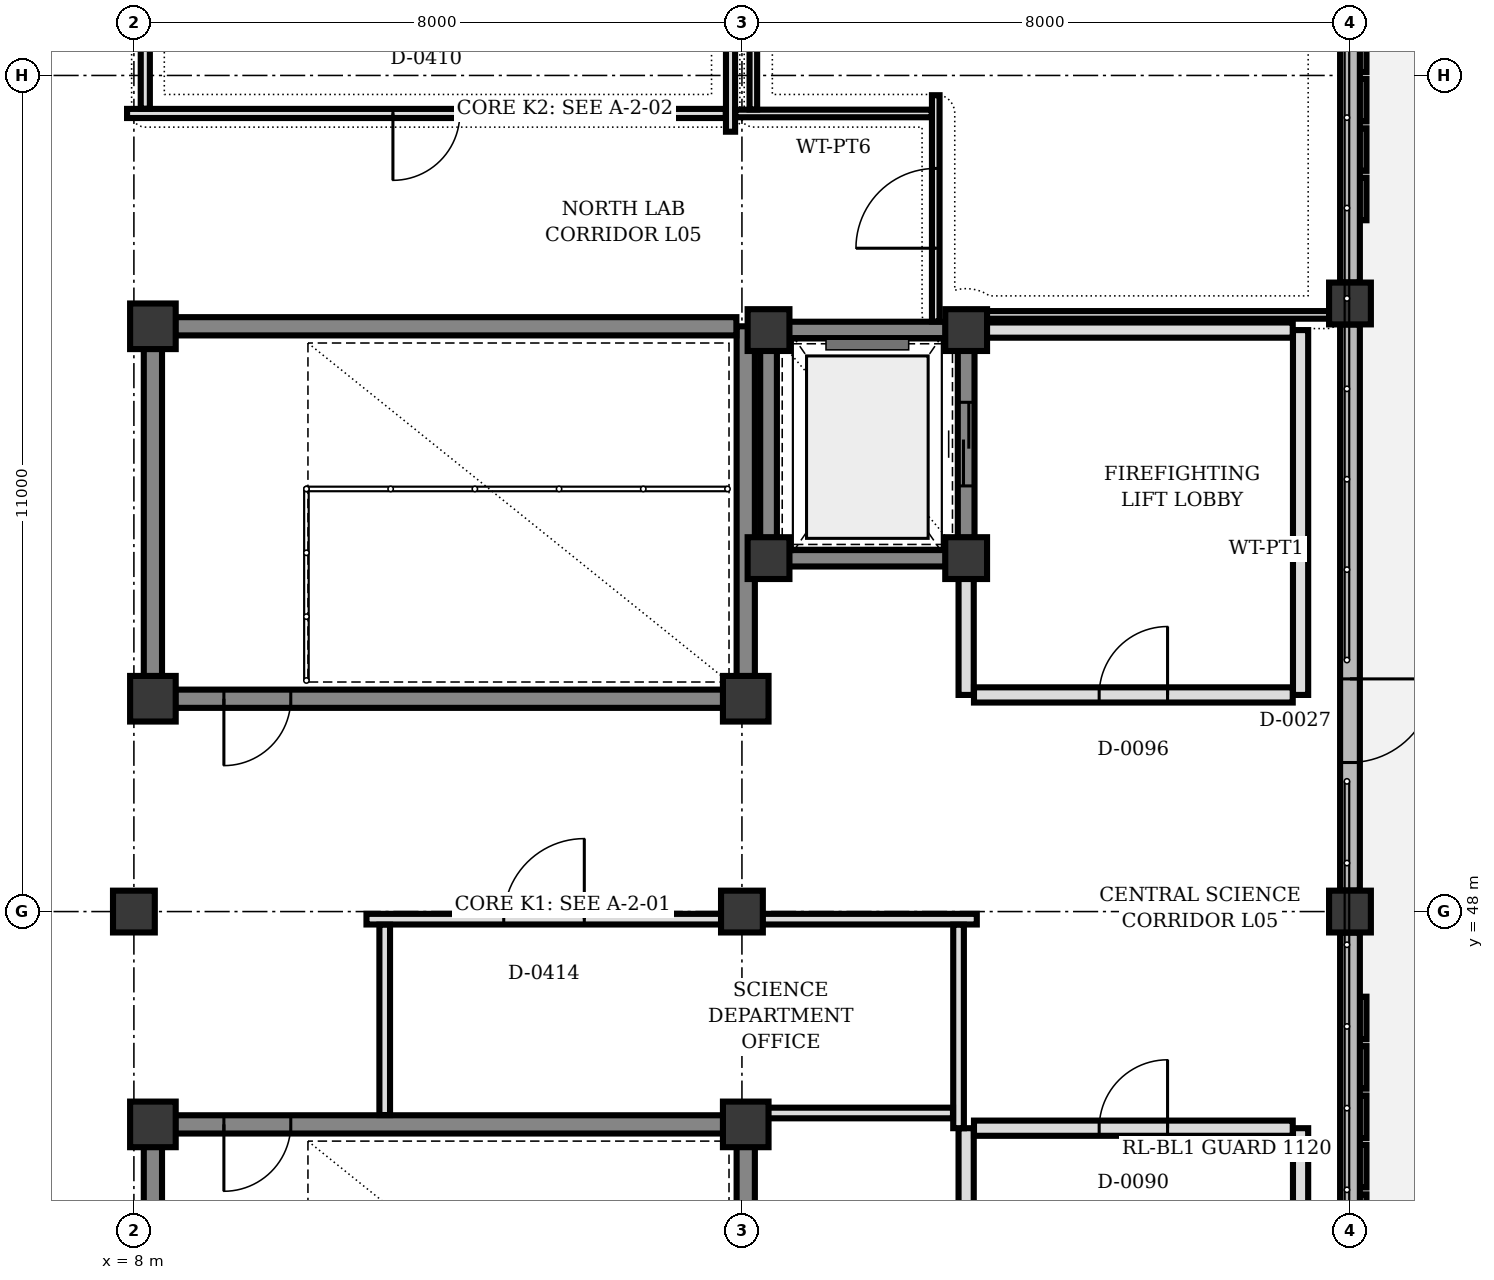
"""IFC4 building model, lengths in metres.
Left out: names, types, materials, properties, quantities, classifications, styles, units other than length and angle.
Written with IfcOpenShell. Run it as: python <this file> out.ifc"""

import sys

from ifc_helpers import new_model, si_unit, direction, frame, frame_2d, origin, origin_2d, place, context, subcontext, project, spatial, rectangle, extrude, element, fill, save


model = new_model("IFC4")
c1 = context("Model", 3, precision=1e-05, world=origin(), true_north=direction((0.0, 1.0)))
c2 = subcontext(c1, "Body", "Model", "MODEL_VIEW")
j1 = project(units=[si_unit("LENGTHUNIT", "METRE"), si_unit("PLANEANGLEUNIT", "RADIAN")], contexts=[c1])
p1 = place(None, origin())
s1 = spatial("IfcSite", under=j1, at=p1, CompositionType="ELEMENT")
p2 = place(p1, origin())
s2 = spatial("IfcBuilding", under=s1, at=p2, CompositionType="ELEMENT")
p3 = place(p2, frame((0.0, 0.0, 20.5)))
s3 = spatial("IfcBuildingStorey", under=s2, at=p3, CompositionType="ELEMENT", Elevation=20.5)
for number, where, z_axis, x_axis in (
    (1, (16.05, 45.2, 0.0), (0.0, 0.0, 1.0), (1.0, 0.0, 0.0)),
    (2, (8.25, 45.2, 0.0), (0.0, 0.0, 1.0), (1.0, 0.0, 0.0)),
    (3, (8.25, 50.8, 0.0), (0.0, 0.0, 1.0), (1.0, 0.0, 0.0)),
    (4, (16.05, 50.8, 0.0), (0.0, 0.0, 1.0), (1.0, 0.0, 0.0)),
    (5, (8.25, 55.7, 0.0), (0.0, 0.0, 1.0), (1.0, 0.0, 0.0)),
):
    element("IfcColumn", number, at=place(p3, frame(where, z_axis=z_axis, x_axis=x_axis)), inside=s3, PredefinedType="COLUMN", context=c2, shape_type="SweptSolid", body=[
        extrude(rectangle(XDim=0.6, YDim=0.6, at=origin_2d()), origin(), (0.0, 0.0, 1.0), 4.0),
    ])
for number, where, z_axis, x_axis in (
    (6, (16.35, 52.65, 0.0), (0.0, 0.0, 1.0), (1.0, 0.0, 0.0)),
    (7, (18.95, 52.65, 0.0), (0.0, 0.0, 1.0), (1.0, 0.0, 0.0)),
    (8, (18.95, 55.65, 0.0), (0.0, 0.0, 1.0), (1.0, 0.0, 0.0)),
    (9, (16.35, 55.65, 0.0), (0.0, 0.0, 1.0), (1.0, 0.0, 0.0)),
    (10, (16.0, 48.0, 0.0), (0.0, 0.0, 1.0), (1.0, 0.0, 0.0)),
    (11, (24.0, 48.0, 0.0), (0.0, 0.0, 1.0), (1.0, 0.0, 0.0)),
    (12, (24.0, 56.0, 0.0), (0.0, 0.0, 1.0), (1.0, 0.0, 0.0)),
    (13, (8.0, 48.0, 0.0), (0.0, 0.0, 1.0), (1.0, 0.0, 0.0)),
):
    element("IfcColumn", number, at=place(p3, frame(where, z_axis=z_axis, x_axis=x_axis)), inside=s3, PredefinedType="COLUMN", context=c2, shape_type="SweptSolid", body=[
        extrude(rectangle(XDim=0.55, YDim=0.55, at=origin_2d()), origin(), (0.0, 0.0, 1.0), 4.0),
    ])
p4 = place(p3, frame((24.0, 61.723, 0.0), z_axis=(0.0, 0.0, 1.0), x_axis=(0.0, -1.0, 0.0)))
e14 = element("IfcWall", 14, at=p4, inside=s3, PredefinedType="SOLIDWALL", context=c2, shape_type="SweptSolid", body=[
    extrude(rectangle(XDim=5.446, YDim=0.26, at=frame_2d((2.723, 0.0))), origin(), (0.0, 0.0, 1.0), 3.545),
])
p5 = place(p3, frame((24.0, 55.723, 0.0), z_axis=(0.0, 0.0, 1.0), x_axis=(0.0, -1.0, 0.0)))
e15 = element("IfcWall", 15, at=p5, inside=s3, PredefinedType="SOLIDWALL", context=c2, shape_type="SweptSolid", body=[
    extrude(rectangle(XDim=7.446, YDim=0.26, at=frame_2d((3.723, 0.0))), origin(), (0.0, 0.0, 1.0), 3.435),
])
p6 = place(p5, frame((4.662, 0.0, 0.0)))
e16 = element("IfcOpeningElement", 16, at=p6, cuts=e15, PredefinedType="OPENING", context=c2, shape_type="SweptSolid", body=[
    extrude(rectangle(XDim=1.1, YDim=2.25, at=frame_2d((0.55, 1.125))), frame((0.0, 0.14, 0.0), z_axis=(0.0, -1.0, 0.0), x_axis=(1.0, 0.0, 0.0)), (0.0, 0.0, 1.0), 0.28),
])
p7 = place(p3, frame((24.0, 47.723, 0.0), z_axis=(0.0, 0.0, 1.0), x_axis=(0.0, -1.0, 0.0)))
e17 = element("IfcWall", 17, at=p7, inside=s3, PredefinedType="SOLIDWALL", context=c2, shape_type="SweptSolid", body=[
    extrude(rectangle(XDim=7.446, YDim=0.26, at=frame_2d((3.723, 0.0))), origin(), (0.0, 0.0, 1.0), 3.397),
])
p8 = place(p3, frame((8.25, 40.592, 0.0), z_axis=(0.0, 0.0, 1.0), x_axis=(0.0, 1.0, 0.0)))
e18 = element("IfcWall", 18, at=p8, inside=s3, PredefinedType="SHEAR", context=c2, shape_type="SweptSolid", body=[
    extrude(rectangle(XDim=4.316, YDim=0.24, at=frame_2d((2.158, 0.0))), origin(), (0.0, 0.0, 1.0), 3.74),
])
p9 = place(p3, frame((16.05, 44.908, 0.0), z_axis=(0.0, 0.0, 1.0), x_axis=(0.0, -1.0, 0.0)))
e19 = element("IfcWall", 19, at=p9, inside=s3, PredefinedType="SHEAR", context=c2, shape_type="SweptSolid", body=[
    extrude(rectangle(XDim=4.608, YDim=0.24, at=frame_2d((2.304, 0.0))), origin(), (0.0, 0.0, 1.0), 3.74),
])
p10 = place(p3, frame((15.758, 45.2, 0.0), z_axis=(0.0, 0.0, 1.0), x_axis=(-1.0, 0.0, 0.0)))
e20 = element("IfcWall", 20, at=p10, inside=s3, PredefinedType="SHEAR", context=c2, shape_type="SweptSolid", body=[
    extrude(rectangle(XDim=7.216, YDim=0.24, at=frame_2d((3.608, 0.0))), origin(), (0.0, 0.0, 1.0), 3.74),
])
p11 = place(p10, frame((5.694, 0.0, 0.0)))
e21 = element("IfcOpeningElement", 21, at=p11, cuts=e20, PredefinedType="OPENING", context=c2, shape_type="SweptSolid", body=[
    extrude(rectangle(XDim=0.88, YDim=2.1, at=frame_2d((0.44, 1.05))), frame((0.0, 0.13, 0.0), z_axis=(0.0, -1.0, 0.0), x_axis=(1.0, 0.0, 0.0)), (0.0, 0.0, 1.0), 0.26),
])
p12 = place(p3, frame((8.25, 51.092, 0.0), z_axis=(0.0, 0.0, 1.0), x_axis=(0.0, 1.0, 0.0)))
e22 = element("IfcWall", 22, at=p12, inside=s3, PredefinedType="SHEAR", context=c2, shape_type="SweptSolid", body=[
    extrude(rectangle(XDim=4.316, YDim=0.24, at=frame_2d((2.158, 0.0))), origin(), (0.0, 0.0, 1.0), 3.74),
])
p13 = place(p3, frame((16.05, 55.7, 0.0), z_axis=(0.0, 0.0, 1.0), x_axis=(0.0, -1.0, 0.0)))
e23 = element("IfcWall", 23, at=p13, inside=s3, PredefinedType="SHEAR", context=c2, shape_type="SweptSolid", body=[
    extrude(rectangle(XDim=4.608, YDim=0.24, at=frame_2d((2.304, 0.0))), origin(), (0.0, 0.0, 1.0), 3.74),
])
p14 = place(p3, frame((15.758, 50.8, 0.0), z_axis=(0.0, 0.0, 1.0), x_axis=(-1.0, 0.0, 0.0)))
e24 = element("IfcWall", 24, at=p14, inside=s3, PredefinedType="SHEAR", context=c2, shape_type="SweptSolid", body=[
    extrude(rectangle(XDim=7.216, YDim=0.24, at=frame_2d((3.608, 0.0))), origin(), (0.0, 0.0, 1.0), 3.74),
])
p15 = place(p14, frame((5.694, 0.0, 0.0)))
e25 = element("IfcOpeningElement", 25, at=p15, cuts=e24, PredefinedType="OPENING", context=c2, shape_type="SweptSolid", body=[
    extrude(rectangle(XDim=0.88, YDim=2.1, at=frame_2d((0.44, 1.05))), frame((0.0, 0.13, 0.0), z_axis=(0.0, -1.0, 0.0), x_axis=(1.0, 0.0, 0.0)), (0.0, 0.0, 1.0), 0.26),
])
p16 = place(p3, frame((15.927, 55.7, 0.0), z_axis=(0.0, 0.0, 1.0), x_axis=(-1.0, 0.0, 0.0)))
e26 = element("IfcWall", 26, at=p16, inside=s3, PredefinedType="SHEAR", context=c2, shape_type="SweptSolid", body=[
    extrude(rectangle(XDim=7.385, YDim=0.24, at=frame_2d((3.692, 0.0))), origin(), (0.0, 0.0, 1.0), 3.74),
])
p17 = place(p3, frame((18.95, 43.617, 0.0), z_axis=(0.0, 0.0, 1.0), x_axis=(0.0, 1.0, 0.0)))
e27 = element("IfcWall", 27, at=p17, inside=s3, PredefinedType="PARTITIONING", context=c2, shape_type="SweptSolid", body=[
    extrude(rectangle(XDim=1.533, YDim=0.2, at=frame_2d((0.767, 0.0))), origin(), (0.0, 0.0, 1.0), 3.7),
])
p18 = place(p3, frame((23.35, 40.058, 0.0), z_axis=(0.0, 0.0, 1.0), x_axis=(0.0, 1.0, 0.0)))
e28 = element("IfcWall", 28, at=p18, inside=s3, PredefinedType="PARTITIONING", context=c2, shape_type="SweptSolid", body=[
    extrude(rectangle(XDim=5.092, YDim=0.2, at=frame_2d((2.546, 0.0))), origin(), (0.0, 0.0, 1.0), 3.7),
])
p19 = place(p3, frame((19.053, 45.15, 0.0), z_axis=(0.0, 0.0, 1.0), x_axis=(1.0, 0.0, 0.0)))
e29 = element("IfcWall", 29, at=p19, inside=s3, PredefinedType="PARTITIONING", context=c2, shape_type="SweptSolid", body=[
    extrude(rectangle(XDim=4.194, YDim=0.2, at=frame_2d((2.097, 0.0))), origin(), (0.0, 0.0, 1.0), 3.7),
])
p20 = place(p19, frame((1.647, 0.0, 0.0)))
e30 = element("IfcOpeningElement", 30, at=p20, cuts=e29, PredefinedType="OPENING", context=c2, shape_type="SweptSolid", body=[
    extrude(rectangle(XDim=0.9, YDim=2.2, at=frame_2d((0.45, 1.1))), frame((0.0, 0.11, 0.0), z_axis=(0.0, -1.0, 0.0), x_axis=(1.0, 0.0, 0.0)), (0.0, 0.0, 1.0), 0.22),
])
p21 = place(p3, frame((16.617, 52.65, 0.0), z_axis=(0.0, 0.0, 1.0), x_axis=(1.0, 0.0, 0.0)))
e31 = element("IfcWall", 31, at=p21, inside=s3, PredefinedType="SHEAR", context=c2, shape_type="SweptSolid", body=[
    extrude(rectangle(XDim=2.066, YDim=0.22, at=frame_2d((1.033, 0.0))), origin(), (0.0, 0.0, 1.0), 3.74),
])
p22 = place(p3, frame((18.95, 52.917, 0.0), z_axis=(0.0, 0.0, 1.0), x_axis=(0.0, 1.0, 0.0)))
e32 = element("IfcWall", 32, at=p22, inside=s3, PredefinedType="SHEAR", context=c2, shape_type="SweptSolid", body=[
    extrude(rectangle(XDim=2.466, YDim=0.22, at=frame_2d((1.233, 0.0))), origin(), (0.0, 0.0, 1.0), 3.74),
])
p23 = place(p22, frame((0.683, 0.0, 0.0)))
e33 = element("IfcOpeningElement", 33, at=p23, cuts=e32, PredefinedType="OPENING", context=c2, shape_type="SweptSolid", body=[
    extrude(rectangle(XDim=1.1, YDim=2.15, at=frame_2d((0.55, 1.075))), frame((0.0, 0.12, 0.0), z_axis=(0.0, -1.0, 0.0), x_axis=(1.0, 0.0, 0.0)), (0.0, 0.0, 1.0), 0.24),
])
p24 = place(p3, frame((18.683, 55.65, 0.0), z_axis=(0.0, 0.0, 1.0), x_axis=(-1.0, 0.0, 0.0)))
e34 = element("IfcWall", 34, at=p24, inside=s3, PredefinedType="SHEAR", context=c2, shape_type="SweptSolid", body=[
    extrude(rectangle(XDim=2.066, YDim=0.22, at=frame_2d((1.033, 0.0))), origin(), (0.0, 0.0, 1.0), 3.74),
])
p25 = place(p3, frame((16.35, 55.383, 0.0), z_axis=(0.0, 0.0, 1.0), x_axis=(0.0, -1.0, 0.0)))
e35 = element("IfcWall", 35, at=p25, inside=s3, PredefinedType="SHEAR", context=c2, shape_type="SweptSolid", body=[
    extrude(rectangle(XDim=2.466, YDim=0.22, at=frame_2d((1.233, 0.0))), origin(), (0.0, 0.0, 1.0), 3.74),
])
p26 = place(p3, frame((18.95, 50.85, 0.0), z_axis=(0.0, 0.0, 1.0), x_axis=(0.0, 1.0, 0.0)))
e36 = element("IfcWall", 36, at=p26, inside=s3, PredefinedType="PARTITIONING", context=c2, shape_type="SweptSolid", body=[
    extrude(rectangle(XDim=1.533, YDim=0.2, at=frame_2d((0.767, 0.0))), origin(), (0.0, 0.0, 1.0), 3.7),
])
p27 = place(p3, frame((23.35, 50.85, 0.0), z_axis=(0.0, 0.0, 1.0), x_axis=(0.0, 1.0, 0.0)))
e37 = element("IfcWall", 37, at=p27, inside=s3, PredefinedType="PARTITIONING", context=c2, shape_type="SweptSolid", body=[
    extrude(rectangle(XDim=4.8, YDim=0.2, at=frame_2d((2.4, 0.0))), origin(), (0.0, 0.0, 1.0), 3.7),
])
p28 = place(p3, frame((19.217, 55.65, 0.0), z_axis=(0.0, 0.0, 1.0), x_axis=(1.0, 0.0, 0.0)))
e38 = element("IfcWall", 38, at=p28, inside=s3, PredefinedType="PARTITIONING", context=c2, shape_type="SweptSolid", body=[
    extrude(rectangle(XDim=4.03, YDim=0.2, at=frame_2d((2.015, 0.0))), origin(), (0.0, 0.0, 1.0), 3.7),
])
p29 = place(p3, frame((19.053, 50.85, 0.0), z_axis=(0.0, 0.0, 1.0), x_axis=(1.0, 0.0, 0.0)))
e39 = element("IfcWall", 39, at=p29, inside=s3, PredefinedType="PARTITIONING", context=c2, shape_type="SweptSolid", body=[
    extrude(rectangle(XDim=4.194, YDim=0.2, at=frame_2d((2.097, 0.0))), origin(), (0.0, 0.0, 1.0), 3.7),
])
p30 = place(p29, frame((1.647, 0.0, 0.0)))
e40 = element("IfcOpeningElement", 40, at=p30, cuts=e39, PredefinedType="OPENING", context=c2, shape_type="SweptSolid", body=[
    extrude(rectangle(XDim=0.9, YDim=2.2, at=frame_2d((0.45, 1.1))), frame((0.0, 0.11, 0.0), z_axis=(0.0, -1.0, 0.0), x_axis=(1.0, 0.0, 0.0)), (0.0, 0.0, 1.0), 0.22),
])
p31 = place(p3, frame((15.85, 61.733, 0.0), z_axis=(0.0, 0.0, 1.0), x_axis=(0.0, -1.0, 0.0)))
e41 = element("IfcWall", 41, at=p31, inside=s3, PredefinedType="PARTITIONING", context=c2, shape_type="SweptSolid", body=[
    extrude(rectangle(XDim=3.473, YDim=0.12, at=frame_2d((1.736, 0.0))), origin(), (0.0, 0.0, 1.0), 3.7),
])
p32 = place(p3, frame((15.787, 58.5, 0.0), z_axis=(0.0, 0.0, 1.0), x_axis=(-1.0, 0.0, 0.0)))
e42 = element("IfcWall", 42, at=p32, inside=s3, PredefinedType="PARTITIONING", context=c2, shape_type="SweptSolid", body=[
    extrude(rectangle(XDim=7.877, YDim=0.12, at=frame_2d((3.938, 0.0))), origin(), (0.0, 0.0, 1.0), 3.7),
])
p33 = place(p32, frame((3.499, 0.0, 0.0)))
e43 = element("IfcOpeningElement", 43, at=p33, cuts=e42, PredefinedType="OPENING", context=c2, shape_type="SweptSolid", body=[
    extrude(rectangle(XDim=0.88, YDim=2.1, at=frame_2d((0.44, 1.05))), frame((0.0, 0.07, 0.0), z_axis=(0.0, -1.0, 0.0), x_axis=(1.0, 0.0, 0.0)), (0.0, 0.0, 1.0), 0.14),
])
p34 = place(p3, frame((8.15, 58.563, 0.0), z_axis=(0.0, 0.0, 1.0), x_axis=(0.0, 1.0, 0.0)))
e44 = element("IfcWall", 44, at=p34, inside=s3, PredefinedType="PARTITIONING", context=c2, shape_type="SweptSolid", body=[
    extrude(rectangle(XDim=9.377, YDim=0.12, at=frame_2d((4.688, 0.0))), origin(), (0.0, 0.0, 1.0), 3.14),
])
p35 = place(p3, frame((23.733, 55.85, 0.0), z_axis=(0.0, 0.0, 1.0), x_axis=(-1.0, 0.0, 0.0)))
e45 = element("IfcWall", 45, at=p35, inside=s3, PredefinedType="PARTITIONING", context=c2, shape_type="SweptSolid", body=[
    extrude(rectangle(XDim=4.516, YDim=0.1, at=frame_2d((2.258, 0.0))), origin(), (0.0, 0.0, 1.0), 3.7),
])
p36 = place(p3, frame((18.55, 55.763, 0.0), z_axis=(0.0, 0.0, 1.0), x_axis=(0.0, 1.0, 0.0)))
e46 = element("IfcWall", 46, at=p36, inside=s3, PredefinedType="PARTITIONING", context=c2, shape_type="SweptSolid", body=[
    extrude(rectangle(XDim=2.977, YDim=0.1, at=frame_2d((1.489, 0.0))), origin(), (0.0, 0.0, 1.0), 3.7),
])
p37 = place(p36, frame((0.964, 0.0, 0.0)))
e47 = element("IfcOpeningElement", 47, at=p37, cuts=e46, PredefinedType="OPENING", context=c2, shape_type="SweptSolid", body=[
    extrude(rectangle(XDim=1.05, YDim=2.1, at=frame_2d((0.525, 1.05))), frame((0.0, 0.06, 0.0), z_axis=(0.0, -1.0, 0.0), x_axis=(1.0, 0.0, 0.0)), (0.0, 0.0, 1.0), 0.12),
])
p38 = place(p3, frame((18.497, 58.5, 0.0), z_axis=(0.0, 0.0, 1.0), x_axis=(-1.0, 0.0, 0.0)))
e48 = element("IfcWall", 48, at=p38, inside=s3, PredefinedType="PARTITIONING", context=c2, shape_type="SweptSolid", body=[
    extrude(rectangle(XDim=2.584, YDim=0.1, at=frame_2d((1.292, 0.0))), origin(), (0.0, 0.0, 1.0), 3.7),
])
p39 = place(p3, frame((16.15, 58.553, 0.0), z_axis=(0.0, 0.0, 1.0), x_axis=(0.0, 1.0, 0.0)))
e49 = element("IfcWall", 49, at=p39, inside=s3, PredefinedType="PARTITIONING", context=c2, shape_type="SweptSolid", body=[
    extrude(rectangle(XDim=3.18, YDim=0.1, at=frame_2d((1.59, 0.0))), origin(), (0.0, 0.0, 1.0), 3.7),
])
p40 = place(p3, frame((11.06, 47.9, 0.0), z_axis=(0.0, 0.0, 1.0), x_axis=(1.0, 0.0, 0.0)))
e50 = element("IfcWall", 50, at=p40, inside=s3, PredefinedType="PARTITIONING", context=c2, shape_type="SweptSolid", body=[
    extrude(rectangle(XDim=4.673, YDim=0.14, at=frame_2d((2.336, 0.0))), origin(), (0.0, 0.0, 1.0), 3.14),
])
p41 = place(p40, frame((1.806, 0.0, 0.0)))
e51 = element("IfcOpeningElement", 51, at=p41, cuts=e50, PredefinedType="OPENING", context=c2, shape_type="SweptSolid", body=[
    extrude(rectangle(XDim=1.06, YDim=2.2, at=frame_2d((0.53, 1.1))), frame((0.0, 0.08, 0.0), z_axis=(0.0, -1.0, 0.0), x_axis=(1.0, 0.0, 0.0)), (0.0, 0.0, 1.0), 0.16),
])
p42 = place(p3, frame((16.267, 47.9, 0.0), z_axis=(0.0, 0.0, 1.0), x_axis=(1.0, 0.0, 0.0)))
e52 = element("IfcWall", 52, at=p42, inside=s3, PredefinedType="PARTITIONING", context=c2, shape_type="SweptSolid", body=[
    extrude(rectangle(XDim=2.823, YDim=0.14, at=frame_2d((1.412, 0.0))), origin(), (0.0, 0.0, 1.0), 3.14),
])
p43 = place(p3, frame((18.85, 47.827, 0.0), z_axis=(0.0, 0.0, 1.0), x_axis=(0.0, -1.0, 0.0)))
e53 = element("IfcWall", 53, at=p43, inside=s3, PredefinedType="PARTITIONING", context=c2, shape_type="SweptSolid", body=[
    extrude(rectangle(XDim=2.677, YDim=0.14, at=frame_2d((1.338, 0.0))), origin(), (0.0, 0.0, 1.0), 3.14),
])
p44 = place(p3, frame((11.3, 45.323, 0.0), z_axis=(0.0, 0.0, 1.0), x_axis=(0.0, 1.0, 0.0)))
e54 = element("IfcWall", 54, at=p44, inside=s3, PredefinedType="PARTITIONING", context=c2, shape_type="SweptSolid", body=[
    extrude(rectangle(XDim=2.504, YDim=0.14, at=frame_2d((1.252, 0.0))), origin(), (0.0, 0.0, 1.0), 3.14),
])
p45 = place(p3, frame((18.777, 45.35, 0.0), z_axis=(0.0, 0.0, 1.0), x_axis=(-1.0, 0.0, 0.0)))
e55 = element("IfcWall", 55, at=p45, inside=s3, PredefinedType="PARTITIONING", context=c2, shape_type="SweptSolid", body=[
    extrude(rectangle(XDim=2.435, YDim=0.14, at=frame_2d((1.218, 0.0))), origin(), (0.0, 0.0, 1.0), 3.7),
])
p46 = place(p6, origin())
e56 = element("IfcDoor", 56, at=p46, inside=s3, OperationType="SINGLE_SWING_LEFT", PredefinedType="DOOR", context=c2, shape_type="SweptSolid", body=[
    extrude(rectangle(XDim=1.1, YDim=2.25, at=frame_2d((0.55, 1.125))), frame((0.0, 0.025, 0.0), z_axis=(0.0, -1.0, 0.0), x_axis=(1.0, 0.0, 0.0)), (0.0, 0.0, 1.0), 0.05),
])
fill(e16, e56)
p47 = place(p11, origin())
e57 = element("IfcDoor", 57, at=p47, inside=s3, OperationType="SINGLE_SWING_RIGHT", PredefinedType="DOOR", context=c2, shape_type="SweptSolid", body=[
    extrude(rectangle(XDim=0.88, YDim=2.1, at=frame_2d((0.44, 1.05))), frame((0.0, 0.025, 0.0), z_axis=(0.0, -1.0, 0.0), x_axis=(1.0, 0.0, 0.0)), (0.0, 0.0, 1.0), 0.05),
])
fill(e21, e57)
p48 = place(p15, origin())
e58 = element("IfcDoor", 58, at=p48, inside=s3, OperationType="SINGLE_SWING_RIGHT", PredefinedType="DOOR", context=c2, shape_type="SweptSolid", body=[
    extrude(rectangle(XDim=0.88, YDim=2.1, at=frame_2d((0.44, 1.05))), frame((0.0, 0.025, 0.0), z_axis=(0.0, -1.0, 0.0), x_axis=(1.0, 0.0, 0.0)), (0.0, 0.0, 1.0), 0.05),
])
fill(e25, e58)
p49 = place(p20, origin())
e59 = element("IfcDoor", 59, at=p49, inside=s3, OperationType="SINGLE_SWING_RIGHT", PredefinedType="DOOR", context=c2, shape_type="SweptSolid", body=[
    extrude(rectangle(XDim=0.9, YDim=2.2, at=frame_2d((0.45, 1.1))), frame((0.0, 0.025, 0.0), z_axis=(0.0, -1.0, 0.0), x_axis=(1.0, 0.0, 0.0)), (0.0, 0.0, 1.0), 0.05),
])
fill(e30, e59)
p50 = place(p23, origin())
e60 = element("IfcDoor", 60, at=p50, inside=s3, OperationType="DOUBLE_DOOR_SLIDING", PredefinedType="DOOR", context=c2, shape_type="SweptSolid", body=[
    extrude(rectangle(XDim=1.1, YDim=2.15, at=frame_2d((0.55, 1.075))), frame((0.0, 0.025, 0.0), z_axis=(0.0, -1.0, 0.0), x_axis=(1.0, 0.0, 0.0)), (0.0, 0.0, 1.0), 0.05),
])
fill(e33, e60)
p51 = place(p30, origin())
e61 = element("IfcDoor", 61, at=p51, inside=s3, OperationType="SINGLE_SWING_RIGHT", PredefinedType="DOOR", context=c2, shape_type="SweptSolid", body=[
    extrude(rectangle(XDim=0.9, YDim=2.2, at=frame_2d((0.45, 1.1))), frame((0.0, 0.025, 0.0), z_axis=(0.0, -1.0, 0.0), x_axis=(1.0, 0.0, 0.0)), (0.0, 0.0, 1.0), 0.05),
])
fill(e40, e61)
p52 = place(p33, origin())
e62 = element("IfcDoor", 62, at=p52, inside=s3, OperationType="SINGLE_SWING_RIGHT", PredefinedType="DOOR", context=c2, shape_type="SweptSolid", body=[
    extrude(rectangle(XDim=0.88, YDim=2.1, at=frame_2d((0.44, 1.05))), frame((0.0, 0.025, 0.0), z_axis=(0.0, -1.0, 0.0), x_axis=(1.0, 0.0, 0.0)), (0.0, 0.0, 1.0), 0.05),
])
fill(e43, e62)
p53 = place(p37, origin())
e63 = element("IfcDoor", 63, at=p53, inside=s3, OperationType="SINGLE_SWING_LEFT", PredefinedType="DOOR", context=c2, shape_type="SweptSolid", body=[
    extrude(rectangle(XDim=1.05, YDim=2.1, at=frame_2d((0.525, 1.05))), frame((0.0, 0.025, 0.0), z_axis=(0.0, -1.0, 0.0), x_axis=(1.0, 0.0, 0.0)), (0.0, 0.0, 1.0), 0.05),
])
fill(e47, e63)
p54 = place(p41, origin())
e64 = element("IfcDoor", 64, at=p54, inside=s3, OperationType="SINGLE_SWING_RIGHT", PredefinedType="DOOR", context=c2, shape_type="SweptSolid", body=[
    extrude(rectangle(XDim=1.06, YDim=2.2, at=frame_2d((0.53, 1.1))), frame((0.0, 0.025, 0.0), z_axis=(0.0, -1.0, 0.0), x_axis=(1.0, 0.0, 0.0)), (0.0, 0.0, 1.0), 0.05),
])
fill(e51, e64)
save(model, sys.argv[1])
